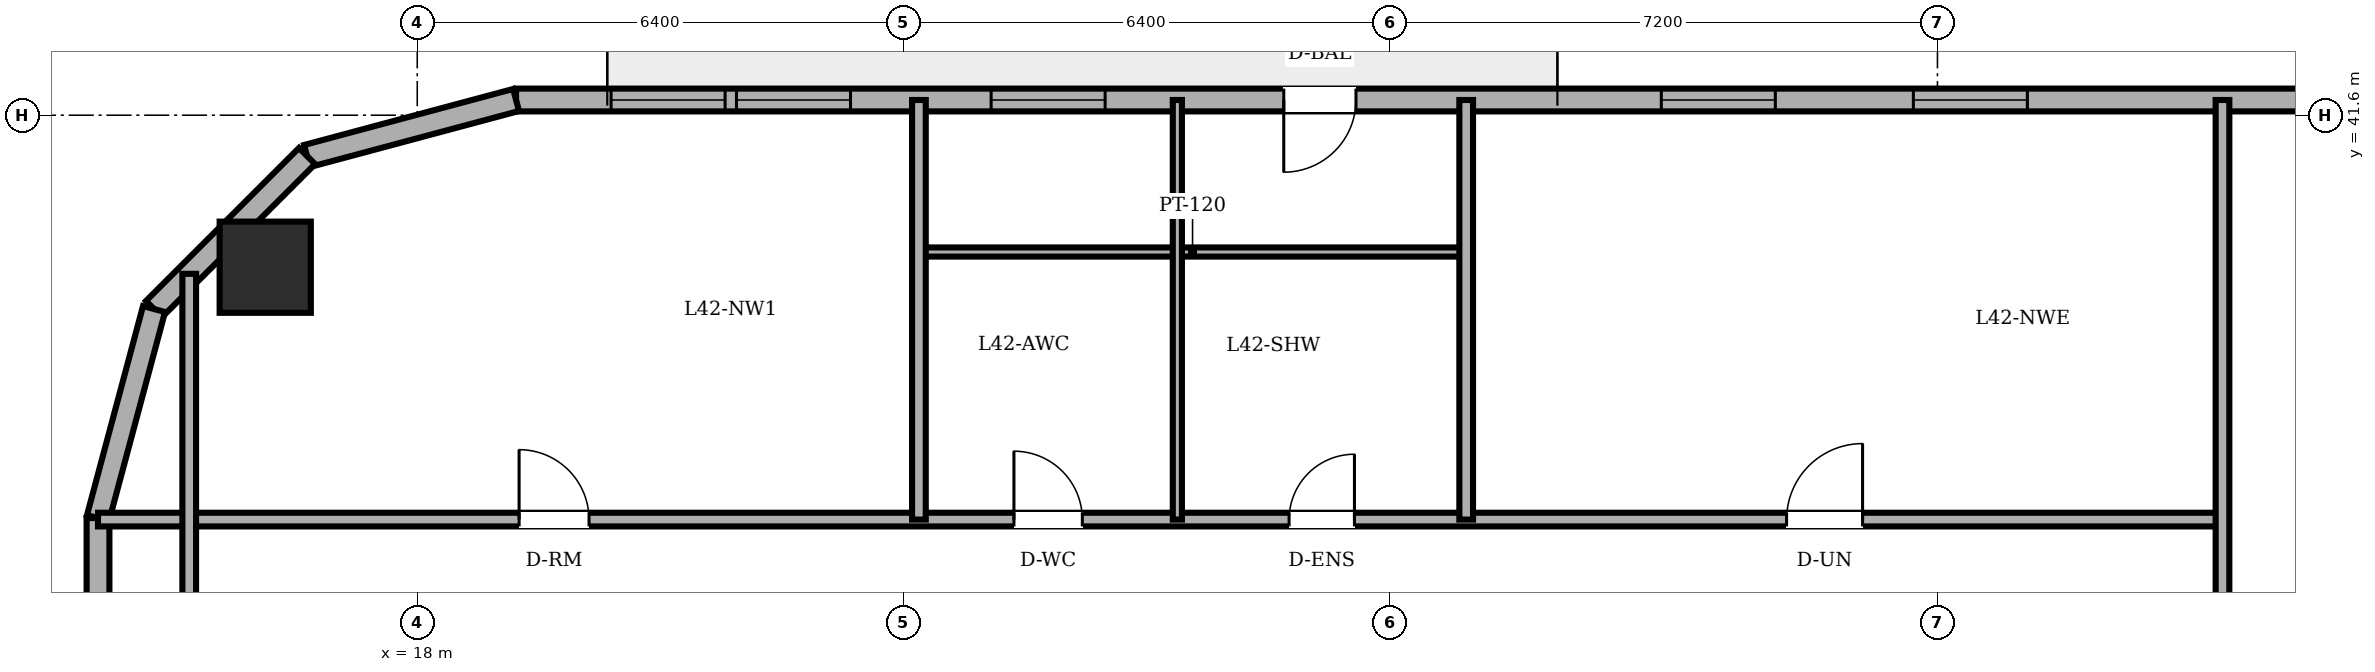
"""IFC4 building model, lengths in metres.
Left out: names, types, materials, properties, quantities, classifications, styles, units other than length and angle.
Written with IfcOpenShell. Run it as: python <this file> out.ifc"""

import sys

from ifc_helpers import new_model, si_unit, direction, frame, frame_2d, origin, origin_2d, place, context, subcontext, project, spatial, rectangle, circle, extrude, element, fill, save


model = new_model("IFC4")
c1 = context("Model", 3, precision=1e-05, world=origin(), true_north=direction((0.0, 1.0)))
c2 = subcontext(c1, "Body", "Model", "MODEL_VIEW")
j1 = project(units=[si_unit("LENGTHUNIT", "METRE"), si_unit("PLANEANGLEUNIT", "RADIAN")], contexts=[c1])
p1 = place(None, origin())
s1 = spatial("IfcSite", under=j1, at=p1, CompositionType="ELEMENT")
p2 = place(p1, origin())
s2 = spatial("IfcBuilding", under=s1, at=p2, CompositionType="ELEMENT")
p3 = place(p2, frame((0.0, 0.0, 161.8)))
s3 = spatial("IfcBuildingStorey", under=s2, at=p3, CompositionType="ELEMENT", Elevation=161.8)
p4 = place(p3, frame((16.0, 39.6, 0.0), z_axis=(0.0, 0.0, 1.0), x_axis=(1.0, 0.0, 0.0)))
e1 = element("IfcColumn", 1, at=p4, inside=s3, PredefinedType="COLUMN", context=c2, shape_type="SweptSolid", body=[
    extrude(circle(Radius=0.6, at=origin_2d()), origin(), (0.0, 0.0, 1.0), 3.6),
])
p5 = place(p3, frame((49.582, 41.8, 0.0), z_axis=(0.0, 0.0, 1.0), x_axis=(-1.0, 0.0, 0.0)))
e2 = element("IfcWall", 2, at=p5, inside=s3, PredefinedType="SOLIDWALL", context=c2, shape_type="SweptSolid", body=[
    extrude(rectangle(XDim=30.282, YDim=0.3, at=frame_2d((15.141, 0.0))), origin(), (0.0, 0.0, 1.0), 3.4),
])
p6 = place(p5, frame((19.232, 0.0, 0.0)))
e3 = element("IfcOpeningElement", 3, at=p6, cuts=e2, PredefinedType="OPENING", context=c2, shape_type="SweptSolid", body=[
    extrude(rectangle(XDim=0.95, YDim=2.2, at=frame_2d((0.475, 1.1))), frame((0.0, 0.16, 0.0), z_axis=(0.0, -1.0, 0.0), x_axis=(1.0, 0.0, 0.0)), (0.0, 0.0, 1.0), 0.32),
])
p7 = place(p5, frame((2.094, 0.0, 0.85)))
e4 = element("IfcOpeningElement", 4, at=p7, cuts=e2, PredefinedType="OPENING", context=c2, shape_type="SweptSolid", body=[
    extrude(rectangle(XDim=1.5, YDim=1.55, at=frame_2d((0.75, 0.775))), frame((0.0, 0.16, 0.0), z_axis=(0.0, -1.0, 0.0), x_axis=(1.0, 0.0, 0.0)), (0.0, 0.0, 1.0), 0.32),
])
p8 = place(p5, frame((4.588, 0.0, 0.85)))
e5 = element("IfcOpeningElement", 5, at=p8, cuts=e2, PredefinedType="OPENING", context=c2, shape_type="SweptSolid", body=[
    extrude(rectangle(XDim=1.5, YDim=1.55, at=frame_2d((0.75, 0.775))), frame((0.0, 0.16, 0.0), z_axis=(0.0, -1.0, 0.0), x_axis=(1.0, 0.0, 0.0)), (0.0, 0.0, 1.0), 0.32),
])
p9 = place(p5, frame((10.399, 0.0, 0.85)))
e6 = element("IfcOpeningElement", 6, at=p9, cuts=e2, PredefinedType="OPENING", context=c2, shape_type="SweptSolid", body=[
    extrude(rectangle(XDim=1.5, YDim=1.55, at=frame_2d((0.75, 0.775))), frame((0.0, 0.16, 0.0), z_axis=(0.0, -1.0, 0.0), x_axis=(1.0, 0.0, 0.0)), (0.0, 0.0, 1.0), 0.32),
])
p10 = place(p5, frame((13.715, 0.0, 0.85)))
e7 = element("IfcOpeningElement", 7, at=p10, cuts=e2, PredefinedType="OPENING", context=c2, shape_type="SweptSolid", body=[
    extrude(rectangle(XDim=1.5, YDim=1.55, at=frame_2d((0.75, 0.775))), frame((0.0, 0.16, 0.0), z_axis=(0.0, -1.0, 0.0), x_axis=(1.0, 0.0, 0.0)), (0.0, 0.0, 1.0), 0.32),
])
p11 = place(p5, frame((22.532, 0.0, 0.85)))
e8 = element("IfcOpeningElement", 8, at=p11, cuts=e2, PredefinedType="OPENING", context=c2, shape_type="SweptSolid", body=[
    extrude(rectangle(XDim=1.5, YDim=1.55, at=frame_2d((0.75, 0.775))), frame((0.0, 0.16, 0.0), z_axis=(0.0, -1.0, 0.0), x_axis=(1.0, 0.0, 0.0)), (0.0, 0.0, 1.0), 0.32),
])
p12 = place(p5, frame((25.882, 0.0, 0.85)))
e9 = element("IfcOpeningElement", 9, at=p12, cuts=e2, PredefinedType="OPENING", context=c2, shape_type="SweptSolid", body=[
    extrude(rectangle(XDim=1.5, YDim=1.55, at=frame_2d((0.75, 0.775))), frame((0.0, 0.16, 0.0), z_axis=(0.0, -1.0, 0.0), x_axis=(1.0, 0.0, 0.0)), (0.0, 0.0, 1.0), 0.32),
])
p13 = place(p5, frame((27.532, 0.0, 0.85)))
e10 = element("IfcOpeningElement", 10, at=p13, cuts=e2, PredefinedType="OPENING", context=c2, shape_type="SweptSolid", body=[
    extrude(rectangle(XDim=1.5, YDim=1.55, at=frame_2d((0.75, 0.775))), frame((0.0, 0.16, 0.0), z_axis=(0.0, -1.0, 0.0), x_axis=(1.0, 0.0, 0.0)), (0.0, 0.0, 1.0), 0.32),
])
p14 = place(p3, frame((19.3, 41.8, 0.0), z_axis=(0.0, 0.0, 1.0), x_axis=(-0.965908238586, -0.258884674387, 0.0)))
e11 = element("IfcWall", 11, at=p14, inside=s3, PredefinedType="SOLIDWALL", context=c2, shape_type="SweptSolid", body=[
    extrude(rectangle(XDim=2.847, YDim=0.3, at=frame_2d((1.424, 0.0))), origin(), (0.0, 0.0, 1.0), 3.4),
])
p15 = place(p3, frame((16.55, 41.063, 0.0), z_axis=(0.0, 0.0, 1.0), x_axis=(-0.707106781187, -0.707106781187, 0.0)))
e12 = element("IfcWall", 12, at=p15, inside=s3, PredefinedType="SOLIDWALL", context=c2, shape_type="SweptSolid", body=[
    extrude(rectangle(XDim=2.847, YDim=0.3, at=frame_2d((1.423, 0.0))), origin(), (0.0, 0.0, 1.0), 3.4),
])
p16 = place(p3, frame((14.537, 39.05, 0.0), z_axis=(0.0, 0.0, 1.0), x_axis=(-0.258884674387, -0.965908238586, 0.0)))
e13 = element("IfcWall", 13, at=p16, inside=s3, PredefinedType="SOLIDWALL", context=c2, shape_type="SweptSolid", body=[
    extrude(rectangle(XDim=2.847, YDim=0.3, at=frame_2d((1.424, 0.0))), origin(), (0.0, 0.0, 1.0), 3.4),
])
p17 = place(p3, frame((13.8, 36.3, 0.0), z_axis=(0.0, 0.0, 1.0), x_axis=(0.0, -1.0, 0.0)))
e14 = element("IfcWall", 14, at=p17, inside=s3, PredefinedType="SOLIDWALL", context=c2, shape_type="SweptSolid", body=[
    extrude(rectangle(XDim=24.6, YDim=0.3, at=frame_2d((12.3, 0.0))), origin(), (0.0, 0.0, 1.0), 3.4),
])
p18 = place(p17, frame((8.277, 0.0, 0.85)))
e15 = element("IfcOpeningElement", 15, at=p18, cuts=e14, PredefinedType="OPENING", context=c2, shape_type="SweptSolid", body=[
    extrude(rectangle(XDim=1.5, YDim=1.55, at=frame_2d((0.75, 0.775))), frame((0.0, 0.16, 0.0), z_axis=(0.0, -1.0, 0.0), x_axis=(1.0, 0.0, 0.0)), (0.0, 0.0, 1.0), 0.32),
])
p19 = place(p17, frame((14.823, 0.0, 0.85)))
e16 = element("IfcOpeningElement", 16, at=p19, cuts=e14, PredefinedType="OPENING", context=c2, shape_type="SweptSolid", body=[
    extrude(rectangle(XDim=1.5, YDim=1.55, at=frame_2d((0.75, 0.775))), frame((0.0, 0.16, 0.0), z_axis=(0.0, -1.0, 0.0), x_axis=(1.0, 0.0, 0.0)), (0.0, 0.0, 1.0), 0.32),
])
p20 = place(p3, frame((13.8, 36.28, 0.0), z_axis=(0.0, 0.0, 1.0), x_axis=(1.0, 0.0, 0.0)))
e17 = element("IfcWall", 17, at=p20, inside=s3, PredefinedType="PARTITIONING", context=c2, shape_type="SweptSolid", body=[
    extrude(rectangle(XDim=27.95, YDim=0.18, at=frame_2d((13.975, 0.0))), origin(), (0.0, 0.0, 1.0), 3.4),
])
p21 = place(p20, frame((12.05, 0.0, 0.0)))
e18 = element("IfcOpeningElement", 18, at=p21, cuts=e17, PredefinedType="OPENING", context=c2, shape_type="SweptSolid", body=[
    extrude(rectangle(XDim=0.9, YDim=2.1, at=frame_2d((0.45, 1.05))), frame((0.0, 0.1, 0.0), z_axis=(0.0, -1.0, 0.0), x_axis=(1.0, 0.0, 0.0)), (0.0, 0.0, 1.0), 0.2),
])
p22 = place(p20, frame((15.67, 0.0, 0.0)))
e19 = element("IfcOpeningElement", 19, at=p22, cuts=e17, PredefinedType="OPENING", context=c2, shape_type="SweptSolid", body=[
    extrude(rectangle(XDim=0.86, YDim=2.1, at=frame_2d((0.43, 1.05))), frame((0.0, 0.1, 0.0), z_axis=(0.0, -1.0, 0.0), x_axis=(1.0, 0.0, 0.0)), (0.0, 0.0, 1.0), 0.2),
])
p23 = place(p20, frame((5.54, 0.0, 0.0)))
e20 = element("IfcOpeningElement", 20, at=p23, cuts=e17, PredefinedType="OPENING", context=c2, shape_type="SweptSolid", body=[
    extrude(rectangle(XDim=0.92, YDim=2.1, at=frame_2d((0.46, 1.05))), frame((0.0, 0.1, 0.0), z_axis=(0.0, -1.0, 0.0), x_axis=(1.0, 0.0, 0.0)), (0.0, 0.0, 1.0), 0.2),
])
p24 = place(p20, frame((22.215, 0.0, 0.0)))
e21 = element("IfcOpeningElement", 21, at=p24, cuts=e17, PredefinedType="OPENING", context=c2, shape_type="SweptSolid", body=[
    extrude(rectangle(XDim=1.0, YDim=2.15, at=frame_2d((0.5, 1.075))), frame((0.0, 0.1, 0.0), z_axis=(0.0, -1.0, 0.0), x_axis=(1.0, 0.0, 0.0)), (0.0, 0.0, 1.0), 0.2),
])
p25 = place(p3, frame((24.6, 39.8, 0.0), z_axis=(0.0, 0.0, 1.0), x_axis=(1.0, 0.0, 0.0)))
e22 = element("IfcWall", 22, at=p25, inside=s3, PredefinedType="PARTITIONING", context=c2, shape_type="SweptSolid", body=[
    extrude(rectangle(XDim=7.2, YDim=0.12, at=frame_2d((3.6, 0.0))), origin(), (0.0, 0.0, 1.0), 2.882),
])
p26 = place(p3, frame((15.0, 33.82, 0.0), z_axis=(0.0, 0.0, 1.0), x_axis=(0.0, 1.0, 0.0)))
e23 = element("IfcWall", 23, at=p26, inside=s3, PredefinedType="PARTITIONING", context=c2, shape_type="SweptSolid", body=[
    extrude(rectangle(XDim=5.693, YDim=0.18, at=frame_2d((2.846, 0.0))), origin(), (0.0, 0.0, 1.0), 3.4),
])
p27 = place(p3, frame((24.6, 36.28, 0.0), z_axis=(0.0, 0.0, 1.0), x_axis=(0.0, 1.0, 0.0)))
e24 = element("IfcWall", 24, at=p27, inside=s3, PredefinedType="PARTITIONING", context=c2, shape_type="SweptSolid", body=[
    extrude(rectangle(XDim=5.52, YDim=0.18, at=frame_2d((2.76, 0.0))), origin(), (0.0, 0.0, 1.0), 3.4),
])
p28 = place(p3, frame((28.0, 36.28, 0.0), z_axis=(0.0, 0.0, 1.0), x_axis=(0.0, 1.0, 0.0)))
e25 = element("IfcWall", 25, at=p28, inside=s3, PredefinedType="PARTITIONING", context=c2, shape_type="SweptSolid", body=[
    extrude(rectangle(XDim=5.52, YDim=0.12, at=frame_2d((2.76, 0.0))), origin(), (0.0, 0.0, 1.0), 3.4),
])
p29 = place(p3, frame((31.8, 36.28, 0.0), z_axis=(0.0, 0.0, 1.0), x_axis=(0.0, 1.0, 0.0)))
e26 = element("IfcWall", 26, at=p29, inside=s3, PredefinedType="PARTITIONING", context=c2, shape_type="SweptSolid", body=[
    extrude(rectangle(XDim=5.52, YDim=0.18, at=frame_2d((2.76, 0.0))), origin(), (0.0, 0.0, 1.0), 3.4),
])
p30 = place(p3, frame((41.75, 25.18, 0.0), z_axis=(0.0, 0.0, 1.0), x_axis=(0.0, 1.0, 0.0)))
e27 = element("IfcWall", 27, at=p30, inside=s3, PredefinedType="PARTITIONING", context=c2, shape_type="SweptSolid", body=[
    extrude(rectangle(XDim=16.62, YDim=0.18, at=frame_2d((8.31, 0.0))), origin(), (0.0, 0.0, 1.0), 3.4),
])
p31 = place(p30, frame((5.35, 0.0, 0.0)))
e28 = element("IfcOpeningElement", 28, at=p31, cuts=e27, PredefinedType="OPENING", context=c2, shape_type="SweptSolid", body=[
    extrude(rectangle(XDim=0.92, YDim=2.1, at=frame_2d((0.46, 1.05))), frame((0.0, 0.1, 0.0), z_axis=(0.0, -1.0, 0.0), x_axis=(1.0, 0.0, 0.0)), (0.0, 0.0, 1.0), 0.2),
])
p32 = place(p6, origin())
e29 = element("IfcDoor", 29, at=p32, inside=s3, OperationType="SINGLE_SWING_RIGHT", PredefinedType="DOOR", context=c2, shape_type="SweptSolid", body=[
    extrude(rectangle(XDim=0.95, YDim=2.2, at=frame_2d((0.475, 1.1))), frame((0.0, 0.025, 0.0), z_axis=(0.0, -1.0, 0.0), x_axis=(1.0, 0.0, 0.0)), (0.0, 0.0, 1.0), 0.05),
])
fill(e3, e29)
p33 = place(p9, origin())
e30 = element("IfcWindow", 30, at=p33, inside=s3, PartitioningType="DOUBLE_PANEL_VERTICAL", PredefinedType="WINDOW", context=c2, shape_type="SweptSolid", body=[
    extrude(rectangle(XDim=1.5, YDim=1.55, at=frame_2d((0.75, 0.775))), frame((0.0, 0.03, 0.0), z_axis=(0.0, -1.0, 0.0), x_axis=(1.0, 0.0, 0.0)), (0.0, 0.0, 1.0), 0.06),
])
fill(e6, e30)
p34 = place(p10, origin())
e31 = element("IfcWindow", 31, at=p34, inside=s3, PartitioningType="DOUBLE_PANEL_VERTICAL", PredefinedType="WINDOW", context=c2, shape_type="SweptSolid", body=[
    extrude(rectangle(XDim=1.5, YDim=1.55, at=frame_2d((0.75, 0.775))), frame((0.0, 0.03, 0.0), z_axis=(0.0, -1.0, 0.0), x_axis=(1.0, 0.0, 0.0)), (0.0, 0.0, 1.0), 0.06),
])
fill(e7, e31)
p35 = place(p11, origin())
e32 = element("IfcWindow", 32, at=p35, inside=s3, PartitioningType="DOUBLE_PANEL_VERTICAL", PredefinedType="WINDOW", context=c2, shape_type="SweptSolid", body=[
    extrude(rectangle(XDim=1.5, YDim=1.55, at=frame_2d((0.75, 0.775))), frame((0.0, 0.03, 0.0), z_axis=(0.0, -1.0, 0.0), x_axis=(1.0, 0.0, 0.0)), (0.0, 0.0, 1.0), 0.06),
])
fill(e8, e32)
p36 = place(p12, origin())
e33 = element("IfcWindow", 33, at=p36, inside=s3, PartitioningType="DOUBLE_PANEL_VERTICAL", PredefinedType="WINDOW", context=c2, shape_type="SweptSolid", body=[
    extrude(rectangle(XDim=1.5, YDim=1.55, at=frame_2d((0.75, 0.775))), frame((0.0, 0.03, 0.0), z_axis=(0.0, -1.0, 0.0), x_axis=(1.0, 0.0, 0.0)), (0.0, 0.0, 1.0), 0.06),
])
fill(e9, e33)
p37 = place(p13, origin())
e34 = element("IfcWindow", 34, at=p37, inside=s3, PartitioningType="DOUBLE_PANEL_VERTICAL", PredefinedType="WINDOW", context=c2, shape_type="SweptSolid", body=[
    extrude(rectangle(XDim=1.5, YDim=1.55, at=frame_2d((0.75, 0.775))), frame((0.0, 0.03, 0.0), z_axis=(0.0, -1.0, 0.0), x_axis=(1.0, 0.0, 0.0)), (0.0, 0.0, 1.0), 0.06),
])
fill(e10, e34)
p38 = place(p21, origin())
e35 = element("IfcDoor", 35, at=p38, inside=s3, OperationType="SINGLE_SWING_LEFT", PredefinedType="DOOR", context=c2, shape_type="SweptSolid", body=[
    extrude(rectangle(XDim=0.9, YDim=2.1, at=frame_2d((0.45, 1.05))), frame((0.0, 0.025, 0.0), z_axis=(0.0, -1.0, 0.0), x_axis=(1.0, 0.0, 0.0)), (0.0, 0.0, 1.0), 0.05),
])
fill(e18, e35)
p39 = place(p22, origin())
e36 = element("IfcDoor", 36, at=p39, inside=s3, OperationType="SINGLE_SWING_RIGHT", PredefinedType="DOOR", context=c2, shape_type="SweptSolid", body=[
    extrude(rectangle(XDim=0.86, YDim=2.1, at=frame_2d((0.43, 1.05))), frame((0.0, 0.025, 0.0), z_axis=(0.0, -1.0, 0.0), x_axis=(1.0, 0.0, 0.0)), (0.0, 0.0, 1.0), 0.05),
])
fill(e19, e36)
p40 = place(p23, origin())
e37 = element("IfcDoor", 37, at=p40, inside=s3, OperationType="SINGLE_SWING_LEFT", PredefinedType="DOOR", context=c2, shape_type="SweptSolid", body=[
    extrude(rectangle(XDim=0.92, YDim=2.1, at=frame_2d((0.46, 1.05))), frame((0.0, 0.025, 0.0), z_axis=(0.0, -1.0, 0.0), x_axis=(1.0, 0.0, 0.0)), (0.0, 0.0, 1.0), 0.05),
])
fill(e20, e37)
p41 = place(p24, origin())
e38 = element("IfcDoor", 38, at=p41, inside=s3, OperationType="SINGLE_SWING_RIGHT", PredefinedType="DOOR", context=c2, shape_type="SweptSolid", body=[
    extrude(rectangle(XDim=1.0, YDim=2.15, at=frame_2d((0.5, 1.075))), frame((0.0, 0.025, 0.0), z_axis=(0.0, -1.0, 0.0), x_axis=(1.0, 0.0, 0.0)), (0.0, 0.0, 1.0), 0.05),
])
fill(e21, e38)
save(model, sys.argv[1])
